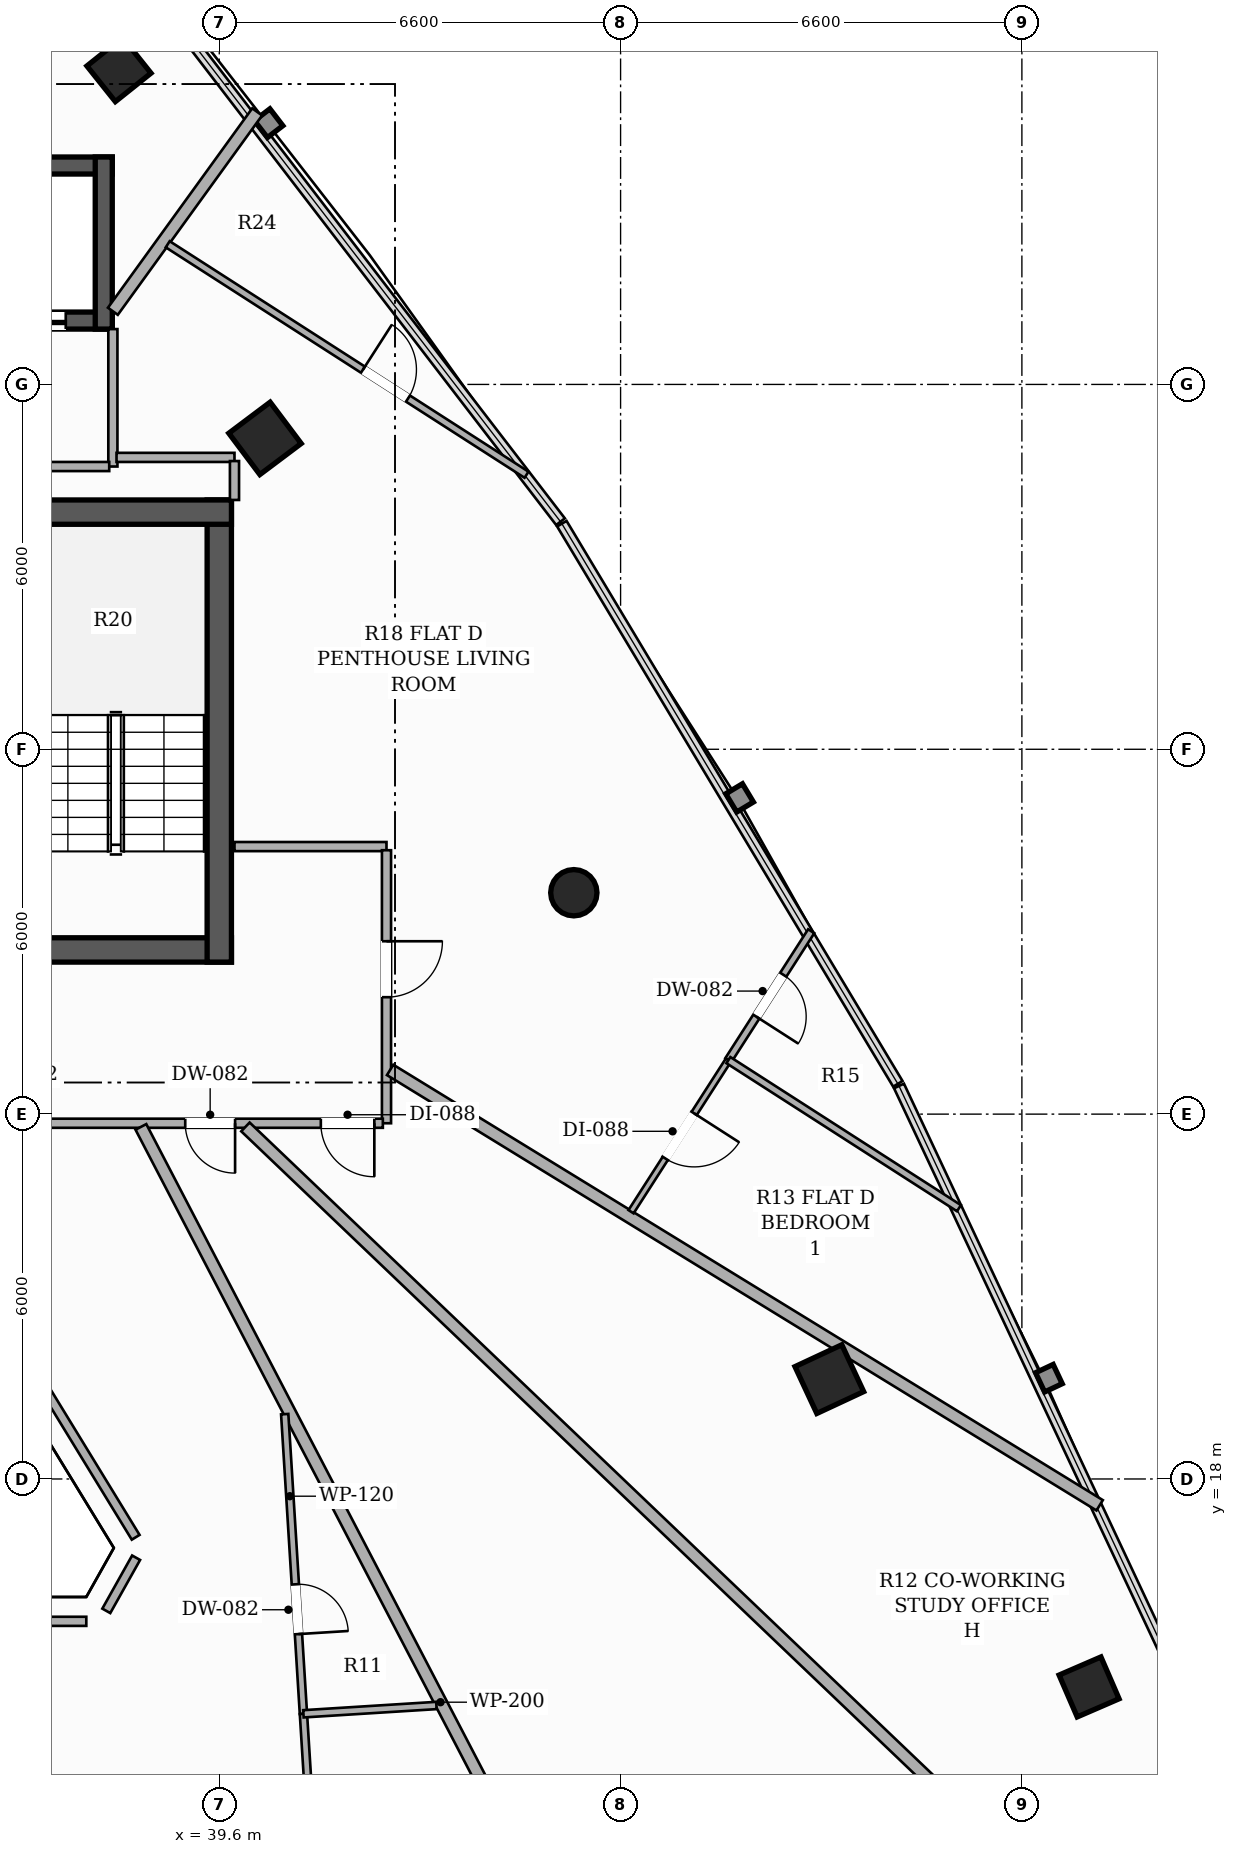
"""IFC4 building model, lengths in metres.
Left out: names, types, materials, properties, quantities, classifications, styles, units other than length and angle.
Written with IfcOpenShell. Run it as: python <this file> out.ifc"""

import sys

from ifc_helpers import new_model, si_unit, direction, frame, frame_2d, origin, origin_2d, place, context, subcontext, project, spatial, rectangle, hollow_rectangle, hollow_circle, extrude, element, fill, save


model = new_model("IFC4")
c1 = context("Model", 3, precision=1e-05, world=origin(), true_north=direction((0.0, 1.0)))
c2 = subcontext(c1, "Body", "Model", "MODEL_VIEW")
j1 = project(units=[si_unit("LENGTHUNIT", "METRE"), si_unit("PLANEANGLEUNIT", "RADIAN")], contexts=[c1])
p1 = place(None, origin())
s1 = spatial("IfcSite", under=j1, at=p1, CompositionType="ELEMENT")
p2 = place(p1, origin())
s2 = spatial("IfcBuilding", under=s1, at=p2, CompositionType="ELEMENT")
p3 = place(p2, frame((0.0, 0.0, 170.45)))
s3 = spatial("IfcBuildingStorey", under=s2, at=p3, CompositionType="ELEMENT", Elevation=170.45)
p4 = place(p3, frame((26.2, 26.7, 0.0), z_axis=(0.0, 0.0, 1.0), x_axis=(1.0, 0.0, 0.0)))
e1 = element("IfcWall", 1, at=p4, inside=s3, PredefinedType="SHEAR", context=c2, shape_type="SweptSolid", body=[
    extrude(rectangle(XDim=13.6, YDim=0.4, at=frame_2d((6.8, 0.0))), origin(), (0.0, 0.0, 1.0), 3.3),
])
p5 = place(p4, frame((4.35, 0.0, 0.0)))
e2 = element("IfcOpeningElement", 2, at=p5, cuts=e1, PredefinedType="OPENING", context=c2, shape_type="SweptSolid", body=[
    extrude(rectangle(XDim=1.05, YDim=2.15, at=frame_2d((0.525, 1.075))), frame((0.0, 0.21, 0.0), z_axis=(0.0, -1.0, 0.0), x_axis=(1.0, 0.0, 0.0)), (0.0, 0.0, 1.0), 0.42),
])
p6 = place(p4, frame((8.3, 0.0, 0.0)))
e3 = element("IfcOpeningElement", 3, at=p6, cuts=e1, PredefinedType="OPENING", context=c2, shape_type="SweptSolid", body=[
    extrude(rectangle(XDim=1.05, YDim=2.15, at=frame_2d((0.525, 1.075))), frame((0.0, 0.21, 0.0), z_axis=(0.0, -1.0, 0.0), x_axis=(1.0, 0.0, 0.0)), (0.0, 0.0, 1.0), 0.42),
])
p7 = place(p3, frame((39.6, 26.5, 0.0), z_axis=(0.0, 0.0, 1.0), x_axis=(0.0, 1.0, 0.0)))
e4 = element("IfcWall", 4, at=p7, inside=s3, PredefinedType="SHEAR", context=c2, shape_type="SweptSolid", body=[
    extrude(rectangle(XDim=7.6, YDim=0.4, at=frame_2d((3.8, 0.0))), origin(), (0.0, 0.0, 1.0), 3.3),
])
p8 = place(p3, frame((36.12, 33.9, 0.0), z_axis=(0.0, 0.0, 1.0), x_axis=(1.0, 0.0, 0.0)))
e5 = element("IfcWall", 5, at=p8, inside=s3, PredefinedType="SHEAR", context=c2, shape_type="SweptSolid", body=[
    extrude(rectangle(XDim=3.68, YDim=0.4, at=frame_2d((1.84, 0.0))), origin(), (0.0, 0.0, 1.0), 3.3),
])
p9 = place(p3, frame((37.84, 37.05, 0.0), z_axis=(0.0, 0.0, 1.0), x_axis=(-1.0, 0.0, 0.0)))
e6 = element("IfcWall", 6, at=p9, inside=s3, PredefinedType="SHEAR", context=c2, shape_type="SweptSolid", body=[
    extrude(rectangle(XDim=9.68, YDim=0.28, at=frame_2d((4.84, 0.0))), origin(), (0.0, 0.0, 1.0), 3.3),
])
p10 = place(p9, frame((7.815, 0.0, 0.0)))
e7 = element("IfcOpeningElement", 7, at=p10, cuts=e6, PredefinedType="OPENING", context=c2, shape_type="SweptSolid", body=[
    extrude(rectangle(XDim=1.1, YDim=2.2, at=frame_2d((0.55, 1.1))), frame((0.0, 0.15, 0.0), z_axis=(0.0, -1.0, 0.0), x_axis=(1.0, 0.0, 0.0)), (0.0, 0.0, 1.0), 0.3),
])
p11 = place(p9, frame((0.765, 0.0, 0.0)))
e8 = element("IfcOpeningElement", 8, at=p11, cuts=e6, PredefinedType="OPENING", context=c2, shape_type="SweptSolid", body=[
    extrude(rectangle(XDim=1.1, YDim=2.2, at=frame_2d((0.55, 1.1))), frame((0.0, 0.15, 0.0), z_axis=(0.0, -1.0, 0.0), x_axis=(1.0, 0.0, 0.0)), (0.0, 0.0, 1.0), 0.3),
])
p12 = place(p3, frame((28.16, 39.6, 0.0), z_axis=(0.0, 0.0, 1.0), x_axis=(1.0, 0.0, 0.0)))
e9 = element("IfcWall", 9, at=p12, inside=s3, PredefinedType="SHEAR", context=c2, shape_type="SweptSolid", body=[
    extrude(rectangle(XDim=9.68, YDim=0.28, at=frame_2d((4.84, 0.0))), origin(), (0.0, 0.0, 1.0), 3.3),
])
p13 = place(p3, frame((37.7, 36.91, 0.0), z_axis=(0.0, 0.0, 1.0), x_axis=(0.0, 1.0, 0.0)))
e10 = element("IfcWall", 10, at=p13, inside=s3, PredefinedType="SHEAR", context=c2, shape_type="SweptSolid", body=[
    extrude(rectangle(XDim=2.83, YDim=0.28, at=frame_2d((1.415, 0.0))), origin(), (0.0, 0.0, 1.0), 3.3),
])
p14 = place(p3, frame((49.633, 19.642, 0.0), z_axis=(0.0, 0.0, 1.0), x_axis=(-0.422618261741, 0.906307787037, 0.0)))
e11 = element("IfcColumn", 11, at=p14, inside=s3, PredefinedType="COLUMN", context=c2, shape_type="SweptSolid", body=[
    extrude(hollow_rectangle(XDim=0.85, YDim=0.85, WallThickness=0.028, at=origin_2d()), origin(), (0.0, 0.0, 1.0), 3.3),
])
p15 = place(p3, frame((45.431, 27.641, 0.0), z_axis=(0.0, 0.0, 1.0), x_axis=(1.0, 0.0, 0.0)))
e12 = element("IfcColumn", 12, at=p15, inside=s3, PredefinedType="COLUMN", context=c2, shape_type="SweptSolid", body=[
    extrude(hollow_circle(Radius=0.381, WallThickness=0.022, at=origin_2d()), origin(), (0.0, 0.0, 1.0), 3.3),
])
p16 = place(p3, frame((40.352, 35.113, 0.0), z_axis=(0.0, 0.0, 1.0), x_axis=(-0.600420225326, 0.799684658487, 0.0)))
e13 = element("IfcColumn", 13, at=p16, inside=s3, PredefinedType="COLUMN", context=c2, shape_type="SweptSolid", body=[
    extrude(hollow_rectangle(XDim=0.85, YDim=0.85, WallThickness=0.028, at=origin_2d()), origin(), (0.0, 0.0, 1.0), 3.3),
])
for number, where, z_axis, x_axis in (
    (14, (53.905, 14.58, 0.0), (0.0, 0.0, 1.0), (-0.397, 0.918, 0.0)),
    (15, (37.95, 41.178, 0.0), (0.0, 0.0, 1.0), (-0.624, 0.782, 0.0)),
):
    element("IfcColumn", number, at=place(p3, frame(where, z_axis=z_axis, x_axis=x_axis)), inside=s3, PredefinedType="COLUMN", context=c2, shape_type="SweptSolid", body=[
        extrude(hollow_rectangle(XDim=0.75, YDim=0.75, WallThickness=0.025, at=origin_2d()), origin(), (0.0, 0.0, 1.0), 3.3),
    ])
p17 = place(p3, frame((37.85, 34.65, 0.0), z_axis=(0.0, 0.0, 1.0), x_axis=(0.0, 1.0, 0.0)))
e16 = element("IfcWall", 16, at=p17, inside=s3, PredefinedType="PARTITIONING", context=c2, shape_type="SweptSolid", body=[
    extrude(rectangle(XDim=2.26, YDim=0.15, at=frame_2d((1.13, 0.0))), origin(), (0.0, 0.0, 1.0), 3.06),
])
p18 = place(p3, frame((36.385, 34.65, 0.0), z_axis=(0.0, 0.0, 1.0), x_axis=(1.0, 0.0, 0.0)))
e17 = element("IfcWall", 17, at=p18, inside=s3, PredefinedType="PARTITIONING", context=c2, shape_type="SweptSolid", body=[
    extrude(rectangle(XDim=1.405, YDim=0.15, at=frame_2d((0.703, 0.0))), origin(), (0.0, 0.0, 1.0), 2.425),
])
p19 = place(p3, frame((39.85, 28.4, 0.0), z_axis=(0.0, 0.0, 1.0), x_axis=(1.0, 0.0, 0.0)))
e18 = element("IfcWall", 18, at=p19, inside=s3, PredefinedType="PARTITIONING", context=c2, shape_type="SweptSolid", body=[
    extrude(rectangle(XDim=2.5, YDim=0.15, at=frame_2d((1.25, 0.0))), origin(), (0.0, 0.0, 1.0), 2.721),
])
p20 = place(p3, frame((42.35, 28.34, 0.0), z_axis=(0.0, 0.0, 1.0), x_axis=(0.0, -1.0, 0.0)))
e19 = element("IfcWall", 19, at=p20, inside=s3, PredefinedType="PARTITIONING", context=c2, shape_type="SweptSolid", body=[
    extrude(rectangle(XDim=4.49, YDim=0.15, at=frame_2d((2.245, 0.0))), origin(), (0.0, 0.0, 1.0), 2.721),
])
p21 = place(p20, frame((1.497, 0.0, 0.0)))
e20 = element("IfcOpeningElement", 20, at=p21, cuts=e19, PredefinedType="OPENING", context=c2, shape_type="SweptSolid", body=[
    extrude(rectangle(XDim=0.92, YDim=2.15, at=frame_2d((0.46, 1.075))), frame((0.0, 0.085, 0.0), z_axis=(0.0, -1.0, 0.0), x_axis=(1.0, 0.0, 0.0)), (0.0, 0.0, 1.0), 0.17),
])
p22 = place(p3, frame((42.29, 23.85, 0.0), z_axis=(0.0, 0.0, 1.0), x_axis=(-1.0, 0.0, 0.0)))
e21 = element("IfcWall", 21, at=p22, inside=s3, PredefinedType="PARTITIONING", context=c2, shape_type="SweptSolid", body=[
    extrude(rectangle(XDim=8.225, YDim=0.15, at=frame_2d((4.113, 0.0))), origin(), (0.0, 0.0, 1.0), 2.492),
])
p23 = place(p22, frame((5.493, 0.0, 0.0)))
e22 = element("IfcOpeningElement", 22, at=p23, cuts=e21, PredefinedType="OPENING", context=c2, shape_type="SweptSolid", body=[
    extrude(rectangle(XDim=0.92, YDim=2.15, at=frame_2d((0.46, 1.075))), frame((0.0, 0.085, 0.0), z_axis=(0.0, -1.0, 0.0), x_axis=(1.0, 0.0, 0.0)), (0.0, 0.0, 1.0), 0.17),
])
p24 = place(p22, frame((2.43, 0.0, 0.0)))
e23 = element("IfcOpeningElement", 23, at=p24, cuts=e21, PredefinedType="OPENING", context=c2, shape_type="SweptSolid", body=[
    extrude(rectangle(XDim=0.82, YDim=2.1, at=frame_2d((0.41, 1.05))), frame((0.0, 0.085, 0.0), z_axis=(0.0, -1.0, 0.0), x_axis=(1.0, 0.0, 0.0)), (0.0, 0.0, 1.0), 0.17),
])
p25 = place(p22, frame((0.14, 0.0, 0.0)))
e24 = element("IfcOpeningElement", 24, at=p25, cuts=e21, PredefinedType="OPENING", context=c2, shape_type="SweptSolid", body=[
    extrude(rectangle(XDim=0.88, YDim=2.1, at=frame_2d((0.44, 1.05))), frame((0.0, 0.085, 0.0), z_axis=(0.0, -1.0, 0.0), x_axis=(1.0, 0.0, 0.0)), (0.0, 0.0, 1.0), 0.17),
])
p26 = place(p3, frame((37.91, 34.8, 0.0), z_axis=(0.0, 0.0, 1.0), x_axis=(1.0, 0.0, 0.0)))
e25 = element("IfcWall", 25, at=p26, inside=s3, PredefinedType="PARTITIONING", context=c2, shape_type="SweptSolid", body=[
    extrude(rectangle(XDim=1.94, YDim=0.15, at=frame_2d((0.97, 0.0))), origin(), (0.0, 0.0, 1.0), 2.721),
])
p27 = place(p3, frame((39.85, 34.74, 0.0), z_axis=(0.0, 0.0, 1.0), x_axis=(0.0, -1.0, 0.0)))
e26 = element("IfcWall", 26, at=p27, inside=s3, PredefinedType="PARTITIONING", context=c2, shape_type="SweptSolid", body=[
    extrude(rectangle(XDim=0.64, YDim=0.15, at=frame_2d((0.32, 0.0))), origin(), (0.0, 0.0, 1.0), 2.721),
])
p28 = place(p3, frame((34.096, 23.79, 0.0), z_axis=(0.0, 0.0, 1.0), x_axis=(0.521886794995, -0.853014755564, 0.0)))
e27 = element("IfcWall", 27, at=p28, inside=s3, PredefinedType="PARTITIONING", context=c2, shape_type="SweptSolid", body=[
    extrude(rectangle(XDim=7.912, YDim=0.15, at=frame_2d((3.956, 0.0))), origin(), (0.0, 0.0, 1.0), 2.721),
])
p29 = place(p3, frame((38.232, 16.705, 0.0), z_axis=(0.0, 0.0, 1.0), x_axis=(-0.489011382175, -0.872277403183, 0.0)))
e28 = element("IfcWall", 28, at=p29, inside=s3, PredefinedType="PARTITIONING", context=c2, shape_type="SweptSolid", body=[
    extrude(rectangle(XDim=1.002, YDim=0.15, at=frame_2d((0.501, 0.0))), origin(), (0.0, 0.0, 1.0), 3.06),
])
p30 = place(p3, frame((37.413, 15.659, 0.0), z_axis=(0.0, 0.0, 1.0), x_axis=(-1.0, 0.0, 0.0)))
e29 = element("IfcWall", 29, at=p30, inside=s3, PredefinedType="PARTITIONING", context=c2, shape_type="SweptSolid", body=[
    extrude(rectangle(XDim=8.826, YDim=0.15, at=frame_2d((4.413, 0.0))), origin(), (0.0, 0.0, 1.0), 2.721),
])
p31 = place(p3, frame((38.311, 23.79, 0.0), z_axis=(0.0, 0.0, 1.0), x_axis=(0.461923729454, -0.886919651472, 0.0)))
e30 = element("IfcWall", 30, at=p31, inside=s3, PredefinedType="PARTITIONING", context=c2, shape_type="SweptSolid", body=[
    extrude(rectangle(XDim=21.335, YDim=0.2, at=frame_2d((10.667, 0.0))), origin(), (0.0, 0.0, 1.0), 2.413),
])
p32 = place(p3, frame((37.85, 37.203, 0.0), z_axis=(0.0, 0.0, 1.0), x_axis=(0.586236886407, 0.810139687348, 0.0)))
e31 = element("IfcWall", 31, at=p32, inside=s3, PredefinedType="PARTITIONING", context=c2, shape_type="SweptSolid", body=[
    extrude(rectangle(XDim=4.048, YDim=0.2, at=frame_2d((2.024, 0.0))), origin(), (0.0, 0.0, 1.0), 2.413),
])
p33 = place(p3, frame((54.079, 17.567, 0.0), z_axis=(0.0, 0.0, 1.0), x_axis=(-0.852338446262, 0.5229906051, 0.0)))
e32 = element("IfcWall", 32, at=p33, inside=s3, PredefinedType="PARTITIONING", context=c2, shape_type="SweptSolid", body=[
    extrude(rectangle(XDim=13.691, YDim=0.2, at=frame_2d((6.845, 0.0))), origin(), (0.0, 0.0, 1.0), 2.413),
])
p34 = place(p3, frame((40.03, 23.79, 0.0), z_axis=(0.0, 0.0, 1.0), x_axis=(0.723360866179, -0.690470171174, 0.0)))
e33 = element("IfcWall", 33, at=p34, inside=s3, PredefinedType="PARTITIONING", context=c2, shape_type="SweptSolid", body=[
    extrude(rectangle(XDim=23.953, YDim=0.2, at=frame_2d((11.977, 0.0))), origin(), (0.0, 0.0, 1.0), 2.413),
])
p35 = place(p3, frame((40.676, 19.066, 0.0), z_axis=(0.0, 0.0, 1.0), x_axis=(0.062350581346, -0.998054309647, 0.0)))
e34 = element("IfcWall", 34, at=p35, inside=s3, PredefinedType="PARTITIONING", context=c2, shape_type="SweptSolid", body=[
    extrude(rectangle(XDim=4.938, YDim=0.12, at=frame_2d((2.469, 0.0))), origin(), (0.0, 0.0, 1.0), 2.721),
])
p36 = place(p35, frame((2.804, 0.0, 0.0)))
e35 = element("IfcOpeningElement", 35, at=p36, cuts=e34, PredefinedType="OPENING", context=c2, shape_type="SweptSolid", body=[
    extrude(rectangle(XDim=0.82, YDim=2.1, at=frame_2d((0.41, 1.05))), frame((0.0, 0.07, 0.0), z_axis=(0.0, -1.0, 0.0), x_axis=(1.0, 0.0, 0.0)), (0.0, 0.0, 1.0), 0.14),
])
p37 = place(p3, frame((40.984, 14.138, 0.0), z_axis=(0.0, 0.0, 1.0), x_axis=(0.062518380192, -0.998043812735, 0.0)))
e36 = element("IfcWall", 36, at=p37, inside=s3, PredefinedType="PARTITIONING", context=c2, shape_type="SweptSolid", body=[
    extrude(rectangle(XDim=4.991, YDim=0.12, at=frame_2d((2.495, 0.0))), origin(), (0.0, 0.0, 1.0), 2.721),
])
p38 = place(p37, frame((2.055, 0.0, 0.0)))
e37 = element("IfcOpeningElement", 37, at=p38, cuts=e36, PredefinedType="OPENING", context=c2, shape_type="SweptSolid", body=[
    extrude(rectangle(XDim=0.88, YDim=2.1, at=frame_2d((0.44, 1.05))), frame((0.0, 0.07, 0.0), z_axis=(0.0, -1.0, 0.0), x_axis=(1.0, 0.0, 0.0)), (0.0, 0.0, 1.0), 0.14),
])
p39 = place(p3, frame((43.171, 14.275, 0.0), z_axis=(0.0, 0.0, 1.0), x_axis=(-0.998044767373, -0.062503138479, 0.0)))
e38 = element("IfcWall", 38, at=p39, inside=s3, PredefinedType="PARTITIONING", context=c2, shape_type="SweptSolid", body=[
    extrude(rectangle(XDim=2.191, YDim=0.12, at=frame_2d((1.096, 0.0))), origin(), (0.0, 0.0, 1.0), 2.721),
])
p40 = place(p3, frame((49.335, 27.008, 0.0), z_axis=(0.0, 0.0, 1.0), x_axis=(-0.540512736599, -0.841335831624, 0.0)))
e39 = element("IfcWall", 39, at=p40, inside=s3, PredefinedType="PARTITIONING", context=c2, shape_type="SweptSolid", body=[
    extrude(rectangle(XDim=2.52, YDim=0.12, at=frame_2d((1.26, 0.0))), origin(), (0.0, 0.0, 1.0), 3.06),
])
p41 = place(p40, frame((0.85, 0.0, 0.0)))
e40 = element("IfcOpeningElement", 40, at=p41, cuts=e39, PredefinedType="OPENING", context=c2, shape_type="SweptSolid", body=[
    extrude(rectangle(XDim=0.82, YDim=2.1, at=frame_2d((0.41, 1.05))), frame((0.0, 0.07, 0.0), z_axis=(0.0, -1.0, 0.0), x_axis=(1.0, 0.0, 0.0)), (0.0, 0.0, 1.0), 0.14),
])
p42 = place(p3, frame((38.752, 38.305, 0.0), z_axis=(0.0, 0.0, 1.0), x_axis=(0.84140799898, -0.54040038791, 0.0)))
e41 = element("IfcWall", 41, at=p42, inside=s3, PredefinedType="PARTITIONING", context=c2, shape_type="SweptSolid", body=[
    extrude(rectangle(XDim=7.013, YDim=0.12, at=frame_2d((3.507, 0.0))), origin(), (0.0, 0.0, 1.0), 2.413),
])
p43 = place(p42, frame((3.816, 0.0, 0.0)))
e42 = element("IfcOpeningElement", 42, at=p43, cuts=e41, PredefinedType="OPENING", context=c2, shape_type="SweptSolid", body=[
    extrude(rectangle(XDim=0.88, YDim=2.1, at=frame_2d((0.44, 1.05))), frame((0.0, 0.07, 0.0), z_axis=(0.0, -1.0, 0.0), x_axis=(1.0, 0.0, 0.0)), (0.0, 0.0, 1.0), 0.14),
])
p44 = place(p3, frame((47.973, 24.888, 0.0), z_axis=(0.0, 0.0, 1.0), x_axis=(-0.54033686579, -0.841448793135, 0.0)))
e43 = element("IfcWall", 43, at=p44, inside=s3, PredefinedType="PARTITIONING", context=c2, shape_type="SweptSolid", body=[
    extrude(rectangle(XDim=2.963, YDim=0.1, at=frame_2d((1.481, 0.0))), origin(), (0.0, 0.0, 1.0), 2.413),
])
p45 = place(p44, frame((1.041, 0.0, 0.0)))
e44 = element("IfcOpeningElement", 44, at=p45, cuts=e43, PredefinedType="OPENING", context=c2, shape_type="SweptSolid", body=[
    extrude(rectangle(XDim=0.88, YDim=2.1, at=frame_2d((0.44, 1.05))), frame((0.0, 0.06, 0.0), z_axis=(0.0, -1.0, 0.0), x_axis=(1.0, 0.0, 0.0)), (0.0, 0.0, 1.0), 0.12),
])
p46 = place(p3, frame((51.765, 22.453, 0.0), z_axis=(0.0, 0.0, 1.0), x_axis=(-0.841445922542, 0.540341336044, 0.0)))
e45 = element("IfcWall", 45, at=p46, inside=s3, PredefinedType="PARTITIONING", context=c2, shape_type="SweptSolid", body=[
    extrude(rectangle(XDim=4.507, YDim=0.12, at=frame_2d((2.253, 0.0))), origin(), (0.0, 0.0, 1.0), 3.06),
])
p47 = place(p11, origin())
e46 = element("IfcDoor", 46, at=p47, inside=s3, OperationType="DOUBLE_DOOR_SLIDING", PredefinedType="DOOR", context=c2, shape_type="SweptSolid", body=[
    extrude(rectangle(XDim=1.1, YDim=2.2, at=frame_2d((0.55, 1.1))), frame((0.0, 0.025, 0.0), z_axis=(0.0, -1.0, 0.0), x_axis=(1.0, 0.0, 0.0)), (0.0, 0.0, 1.0), 0.05),
])
fill(e8, e46)
p48 = place(p36, origin())
e47 = element("IfcDoor", 47, at=p48, inside=s3, OperationType="SINGLE_SWING_RIGHT", PredefinedType="DOOR", context=c2, shape_type="SweptSolid", body=[
    extrude(rectangle(XDim=0.82, YDim=2.1, at=frame_2d((0.41, 1.05))), frame((0.0, 0.025, 0.0), z_axis=(0.0, -1.0, 0.0), x_axis=(1.0, 0.0, 0.0)), (0.0, 0.0, 1.0), 0.05),
])
fill(e35, e47)
p49 = place(p21, origin())
e48 = element("IfcDoor", 48, at=p49, inside=s3, OperationType="SINGLE_SWING_LEFT", PredefinedType="DOOR", context=c2, shape_type="SweptSolid", body=[
    extrude(rectangle(XDim=0.92, YDim=2.15, at=frame_2d((0.46, 1.075))), frame((0.0, 0.025, 0.0), z_axis=(0.0, -1.0, 0.0), x_axis=(1.0, 0.0, 0.0)), (0.0, 0.0, 1.0), 0.05),
])
fill(e20, e48)
p50 = place(p41, origin())
e49 = element("IfcDoor", 49, at=p50, inside=s3, OperationType="SINGLE_SWING_RIGHT", PredefinedType="DOOR", context=c2, shape_type="SweptSolid", body=[
    extrude(rectangle(XDim=0.82, YDim=2.1, at=frame_2d((0.41, 1.05))), frame((0.0, 0.025, 0.0), z_axis=(0.0, -1.0, 0.0), x_axis=(1.0, 0.0, 0.0)), (0.0, 0.0, 1.0), 0.05),
])
fill(e40, e49)
p51 = place(p43, origin())
e50 = element("IfcDoor", 50, at=p51, inside=s3, OperationType="SINGLE_SWING_LEFT", PredefinedType="DOOR", context=c2, shape_type="SweptSolid", body=[
    extrude(rectangle(XDim=0.88, YDim=2.1, at=frame_2d((0.44, 1.05))), frame((0.0, 0.025, 0.0), z_axis=(0.0, -1.0, 0.0), x_axis=(1.0, 0.0, 0.0)), (0.0, 0.0, 1.0), 0.05),
])
fill(e42, e50)
p52 = place(p45, origin())
e51 = element("IfcDoor", 51, at=p52, inside=s3, OperationType="SINGLE_SWING_LEFT", PredefinedType="DOOR", context=c2, shape_type="SweptSolid", body=[
    extrude(rectangle(XDim=0.88, YDim=2.1, at=frame_2d((0.44, 1.05))), frame((0.0, 0.025, 0.0), z_axis=(0.0, -1.0, 0.0), x_axis=(1.0, 0.0, 0.0)), (0.0, 0.0, 1.0), 0.05),
])
fill(e44, e51)
p53 = place(p24, origin())
e52 = element("IfcDoor", 52, at=p53, inside=s3, OperationType="SINGLE_SWING_LEFT", PredefinedType="DOOR", context=c2, shape_type="SweptSolid", body=[
    extrude(rectangle(XDim=0.82, YDim=2.1, at=frame_2d((0.41, 1.05))), frame((0.0, 0.025, 0.0), z_axis=(0.0, -1.0, 0.0), x_axis=(1.0, 0.0, 0.0)), (0.0, 0.0, 1.0), 0.05),
])
fill(e23, e52)
p54 = place(p25, origin())
e53 = element("IfcDoor", 53, at=p54, inside=s3, OperationType="SINGLE_SWING_LEFT", PredefinedType="DOOR", context=c2, shape_type="SweptSolid", body=[
    extrude(rectangle(XDim=0.88, YDim=2.1, at=frame_2d((0.44, 1.05))), frame((0.0, 0.025, 0.0), z_axis=(0.0, -1.0, 0.0), x_axis=(1.0, 0.0, 0.0)), (0.0, 0.0, 1.0), 0.05),
])
fill(e24, e53)
save(model, sys.argv[1])
